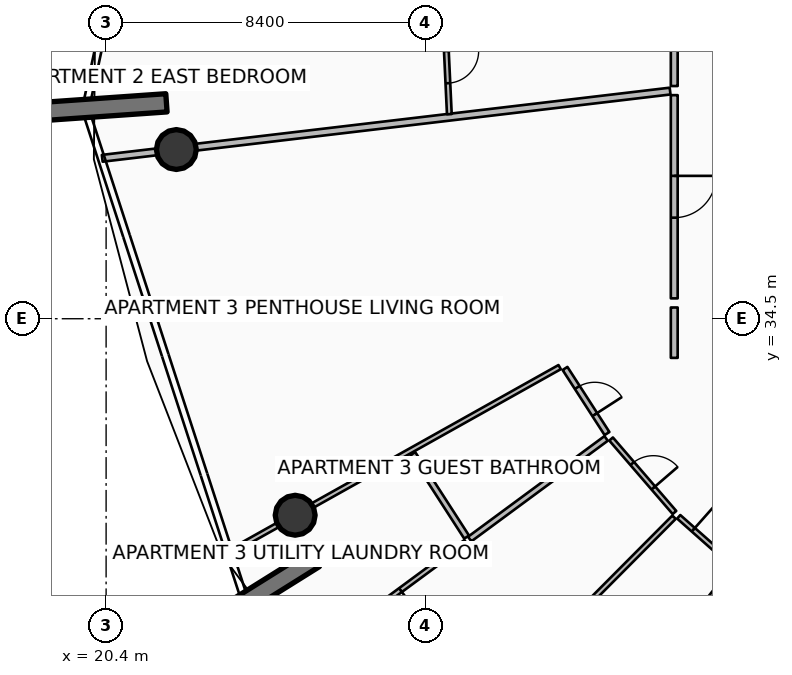
"""IFC4 building model, lengths in metres.
Left out: names, types, materials, properties, quantities, classifications, styles, units other than length and angle.
Written with IfcOpenShell. Run it as: python <this file> out.ifc"""

import sys

from ifc_helpers import new_model, si_unit, direction, frame, frame_2d, origin, origin_2d, place, context, subcontext, project, spatial, rectangle, circle, extrude, element, fill, save


model = new_model("IFC4")
c1 = context("Model", 3, precision=1e-05, world=origin(), true_north=direction((0.0, 1.0)))
c2 = subcontext(c1, "Body", "Model", "MODEL_VIEW")
j1 = project(units=[si_unit("LENGTHUNIT", "METRE"), si_unit("PLANEANGLEUNIT", "RADIAN")], contexts=[c1])
p1 = place(None, origin())
s1 = spatial("IfcSite", under=j1, at=p1, CompositionType="ELEMENT")
p2 = place(p1, origin())
s2 = spatial("IfcBuilding", under=s1, at=p2, CompositionType="ELEMENT")
p3 = place(p2, frame((0.0, 0.0, 180.3)))
s3 = spatial("IfcBuildingStorey", under=s2, at=p3, CompositionType="ELEMENT", Elevation=180.3)
p4 = place(p3, frame((21.987, 40.181, 0.0), z_axis=(0.0, 0.0, 1.0), x_axis=(-0.997568676264, -0.069690287244, 0.0)))
e1 = element("IfcWall", 1, at=p4, inside=s3, PredefinedType="SOLIDWALL", context=c2, shape_type="SweptSolid", body=[
    extrude(rectangle(XDim=3.5, YDim=0.48, at=frame_2d((1.75, 0.0))), origin(), (0.0, 0.0, 1.0), 3.75),
])
p5 = place(p3, frame((25.886, 28.182, 0.0), z_axis=(0.0, 0.0, 1.0), x_axis=(-0.848033572426, -0.529942506352, 0.0)))
e2 = element("IfcWall", 2, at=p5, inside=s3, PredefinedType="SOLIDWALL", context=c2, shape_type="SweptSolid", body=[
    extrude(rectangle(XDim=3.5, YDim=0.48, at=frame_2d((1.75, 0.0))), origin(), (0.0, 0.0, 1.0), 3.75),
])
for number, where, z_axis, x_axis in (
    (3, (22.248, 38.952, 0.0), (0.0, 0.0, 1.0), (1.0, 0.0, 0.0)),
    (4, (25.375, 29.329, 0.0), (0.0, 0.0, 1.0), (1.0, 0.0, 0.0)),
):
    element("IfcColumn", number, at=place(p3, frame(where, z_axis=z_axis, x_axis=x_axis)), inside=s3, PredefinedType="COLUMN", context=c2, shape_type="SweptSolid", body=[
        extrude(circle(Radius=0.525, at=origin_2d()), origin(), (0.0, 0.0, 1.0), 3.5),
    ])
p6 = place(p3, frame((35.241, 40.49, 0.0), z_axis=(0.0, 0.0, 1.0), x_axis=(-0.993066731786, -0.117551972417, 0.0)))
e5 = element("IfcWall", 5, at=p6, inside=s3, PredefinedType="PARTITIONING", context=c2, shape_type="SweptSolid", body=[
    extrude(rectangle(XDim=15.047, YDim=0.18, at=frame_2d((7.523, 0.0))), origin(), (0.0, 0.0, 1.0), 2.94),
])
p7 = place(p3, frame((35.35, 45.448, 0.0), z_axis=(0.0, 0.0, 1.0), x_axis=(0.0, -1.0, 0.0)))
e6 = element("IfcWall", 6, at=p7, inside=s3, PredefinedType="PARTITIONING", context=c2, shape_type="SweptSolid", body=[
    extrude(rectangle(XDim=4.825, YDim=0.18, at=frame_2d((2.413, 0.0))), origin(), (0.0, 0.0, 1.0), 2.94),
])
p8 = place(p3, frame((29.315, 42.361, 0.0), z_axis=(0.0, 0.0, 1.0), x_axis=(0.047144289587, -0.998888089808, 0.0)))
e7 = element("IfcWall", 7, at=p8, inside=s3, PredefinedType="PARTITIONING", context=c2, shape_type="SweptSolid", body=[
    extrude(rectangle(XDim=2.48, YDim=0.125, at=frame_2d((1.24, 0.0))), origin(), (0.0, 0.0, 1.0), 2.94),
])
p9 = place(p8, frame((0.815, 0.0, 0.0)))
e8 = element("IfcOpeningElement", 8, at=p9, cuts=e7, PredefinedType="OPENING", context=c2, shape_type="SweptSolid", body=[
    extrude(rectangle(XDim=0.85, YDim=2.06, at=frame_2d((0.425, 1.03))), frame((0.0, 0.073, 0.0), z_axis=(0.0, -1.0, 0.0), x_axis=(1.0, 0.0, 0.0)), (0.0, 0.0, 1.0), 0.145),
])
p10 = place(p3, frame((35.35, 40.383, 0.0), z_axis=(0.0, 0.0, 1.0), x_axis=(0.0, -1.0, 0.0)))
e9 = element("IfcWall", 9, at=p10, inside=s3, PredefinedType="PARTITIONING", context=c2, shape_type="SweptSolid", body=[
    extrude(rectangle(XDim=5.347, YDim=0.18, at=frame_2d((2.674, 0.0))), origin(), (0.0, 0.0, 1.0), 2.94),
])
p11 = place(p10, frame((2.124, 0.0, 0.0)))
e10 = element("IfcOpeningElement", 10, at=p11, cuts=e9, PredefinedType="OPENING", context=c2, shape_type="SweptSolid", body=[
    extrude(rectangle(XDim=1.1, YDim=2.1, at=frame_2d((0.55, 1.05))), frame((0.0, 0.1, 0.0), z_axis=(0.0, -1.0, 0.0), x_axis=(1.0, 0.0, 0.0)), (0.0, 0.0, 1.0), 0.2),
])
p12 = place(p3, frame((35.35, 34.796, 0.0), z_axis=(0.0, 0.0, 1.0), x_axis=(0.0, -1.0, 0.0)))
e11 = element("IfcWall", 11, at=p12, inside=s3, PredefinedType="PARTITIONING", context=c2, shape_type="SweptSolid", body=[
    extrude(rectangle(XDim=1.326, YDim=0.18, at=frame_2d((0.663, 0.0))), origin(), (0.0, 0.0, 1.0), 2.94),
])
p13 = place(p3, frame((32.334, 33.227, 0.0), z_axis=(0.0, 0.0, 1.0), x_axis=(-0.872500152392, -0.488613839424, 0.0)))
e12 = element("IfcWall", 12, at=p13, inside=s3, PredefinedType="PARTITIONING", context=c2, shape_type="SweptSolid", body=[
    extrude(rectangle(XDim=9.94, YDim=0.125, at=frame_2d((4.97, 0.0))), origin(), (0.0, 0.0, 1.0), 2.94),
])
p14 = place(p3, frame((32.476, 33.192, 0.0), z_axis=(0.0, 0.0, 1.0), x_axis=(0.542143239932, -0.840286086637, 0.0)))
e13 = element("IfcWall", 13, at=p14, inside=s3, PredefinedType="PARTITIONING", context=c2, shape_type="SweptSolid", body=[
    extrude(rectangle(XDim=2.038, YDim=0.15, at=frame_2d((1.019, 0.0))), origin(), (0.0, 0.0, 1.0), 2.94),
])
p15 = place(p14, frame((0.594, 0.0, 0.0)))
e14 = element("IfcOpeningElement", 14, at=p15, cuts=e13, PredefinedType="OPENING", context=c2, shape_type="SweptSolid", body=[
    extrude(rectangle(XDim=0.85, YDim=2.06, at=frame_2d((0.425, 1.03))), frame((0.0, 0.085, 0.0), z_axis=(0.0, -1.0, 0.0), x_axis=(1.0, 0.0, 0.0)), (0.0, 0.0, 1.0), 0.17),
])
p16 = place(p3, frame((28.471, 30.949, 0.0), z_axis=(0.0, 0.0, 1.0), x_axis=(0.542080018781, -0.840326872853, 0.0)))
e15 = element("IfcWall", 15, at=p16, inside=s3, PredefinedType="PARTITIONING", context=c2, shape_type="SweptSolid", body=[
    extrude(rectangle(XDim=2.611, YDim=0.15, at=frame_2d((1.306, 0.0))), origin(), (0.0, 0.0, 1.0), 2.94),
])
p17 = place(p3, frame((33.557, 31.35, 0.0), z_axis=(0.0, 0.0, 1.0), x_axis=(-0.804841149106, -0.593490290322, 0.0)))
e16 = element("IfcWall", 16, at=p17, inside=s3, PredefinedType="PARTITIONING", context=c2, shape_type="SweptSolid", body=[
    extrude(rectangle(XDim=4.46, YDim=0.15, at=frame_2d((2.23, 0.0))), origin(), (0.0, 0.0, 1.0), 2.94),
])
p18 = place(p3, frame((29.863, 28.626, 0.0), z_axis=(0.0, 0.0, 1.0), x_axis=(-0.804842237675, -0.593488814094, 0.0)))
e17 = element("IfcWall", 17, at=p18, inside=s3, PredefinedType="PARTITIONING", context=c2, shape_type="SweptSolid", body=[
    extrude(rectangle(XDim=5.115, YDim=0.125, at=frame_2d((2.558, 0.0))), origin(), (0.0, 0.0, 1.0), 2.94),
])
p19 = place(p18, frame((2.133, 0.0, 0.0)))
e18 = element("IfcOpeningElement", 18, at=p19, cuts=e17, PredefinedType="OPENING", context=c2, shape_type="SweptSolid", body=[
    extrude(rectangle(XDim=0.85, YDim=2.06, at=frame_2d((0.425, 1.03))), frame((0.0, 0.073, 0.0), z_axis=(0.0, -1.0, 0.0), x_axis=(1.0, 0.0, 0.0)), (0.0, 0.0, 1.0), 0.145),
])
p20 = place(p3, frame((35.344, 29.277, 0.0), z_axis=(0.0, 0.0, 1.0), x_axis=(-0.705226489462, -0.708982086206, 0.0)))
e19 = element("IfcWall", 19, at=p20, inside=s3, PredefinedType="PARTITIONING", context=c2, shape_type="SweptSolid", body=[
    extrude(rectangle(XDim=9.166, YDim=0.125, at=frame_2d((4.583, 0.0))), origin(), (0.0, 0.0, 1.0), 2.94),
])
p21 = place(p3, frame((33.688, 31.335, 0.0), z_axis=(0.0, 0.0, 1.0), x_axis=(0.653119308398, -0.757255022431, 0.0)))
e20 = element("IfcWall", 20, at=p21, inside=s3, PredefinedType="PARTITIONING", context=c2, shape_type="SweptSolid", body=[
    extrude(rectangle(XDim=2.553, YDim=0.125, at=frame_2d((1.277, 0.0))), origin(), (0.0, 0.0, 1.0), 2.94),
])
p22 = place(p21, frame((0.852, 0.0, 0.0)))
e21 = element("IfcOpeningElement", 21, at=p22, cuts=e20, PredefinedType="OPENING", context=c2, shape_type="SweptSolid", body=[
    extrude(rectangle(XDim=0.85, YDim=2.06, at=frame_2d((0.425, 1.03))), frame((0.0, 0.073, 0.0), z_axis=(0.0, -1.0, 0.0), x_axis=(1.0, 0.0, 0.0)), (0.0, 0.0, 1.0), 0.145),
])
p23 = place(p3, frame((35.468, 29.288, 0.0), z_axis=(0.0, 0.0, 1.0), x_axis=(0.748399816021, -0.663247853656, 0.0)))
e22 = element("IfcWall", 22, at=p23, inside=s3, PredefinedType="PARTITIONING", context=c2, shape_type="SweptSolid", body=[
    extrude(rectangle(XDim=1.875, YDim=0.125, at=frame_2d((0.938, 0.0))), origin(), (0.0, 0.0, 1.0), 2.94),
])
p24 = place(p23, frame((0.512, 0.0, 0.0)))
e23 = element("IfcOpeningElement", 23, at=p24, cuts=e22, PredefinedType="OPENING", context=c2, shape_type="SweptSolid", body=[
    extrude(rectangle(XDim=0.85, YDim=2.06, at=frame_2d((0.425, 1.03))), frame((0.0, 0.073, 0.0), z_axis=(0.0, -1.0, 0.0), x_axis=(1.0, 0.0, 0.0)), (0.0, 0.0, 1.0), 0.145),
])
p25 = place(p3, frame((36.884, 27.9, 0.0), z_axis=(0.0, 0.0, 1.0), x_axis=(-0.619094580594, -0.785316433216, 0.0)))
e24 = element("IfcWall", 24, at=p25, inside=s3, PredefinedType="PARTITIONING", context=c2, shape_type="SweptSolid", body=[
    extrude(rectangle(XDim=9.175, YDim=0.125, at=frame_2d((4.588, 0.0))), origin(), (0.0, 0.0, 1.0), 2.94),
])
p26 = place(p9, origin())
e25 = element("IfcDoor", 25, at=p26, inside=s3, OperationType="SINGLE_SWING_LEFT", PredefinedType="DOOR", context=c2, shape_type="SweptSolid", body=[
    extrude(rectangle(XDim=0.85, YDim=2.06, at=frame_2d((0.425, 1.03))), frame((0.0, 0.025, 0.0), z_axis=(0.0, -1.0, 0.0), x_axis=(1.0, 0.0, 0.0)), (0.0, 0.0, 1.0), 0.05),
])
fill(e8, e25)
p27 = place(p11, origin())
e26 = element("IfcDoor", 26, at=p27, inside=s3, OperationType="SINGLE_SWING_LEFT", PredefinedType="DOOR", context=c2, shape_type="SweptSolid", body=[
    extrude(rectangle(XDim=1.1, YDim=2.1, at=frame_2d((0.55, 1.05))), frame((0.0, 0.025, 0.0), z_axis=(0.0, -1.0, 0.0), x_axis=(1.0, 0.0, 0.0)), (0.0, 0.0, 1.0), 0.05),
])
fill(e10, e26)
p28 = place(p15, origin())
e27 = element("IfcDoor", 27, at=p28, inside=s3, OperationType="SINGLE_SWING_RIGHT", PredefinedType="DOOR", context=c2, shape_type="SweptSolid", body=[
    extrude(rectangle(XDim=0.85, YDim=2.06, at=frame_2d((0.425, 1.03))), frame((0.0, 0.025, 0.0), z_axis=(0.0, -1.0, 0.0), x_axis=(1.0, 0.0, 0.0)), (0.0, 0.0, 1.0), 0.05),
])
fill(e14, e27)
p29 = place(p19, origin())
e28 = element("IfcDoor", 28, at=p29, inside=s3, OperationType="SINGLE_SWING_LEFT", PredefinedType="DOOR", context=c2, shape_type="SweptSolid", body=[
    extrude(rectangle(XDim=0.85, YDim=2.06, at=frame_2d((0.425, 1.03))), frame((0.0, 0.025, 0.0), z_axis=(0.0, -1.0, 0.0), x_axis=(1.0, 0.0, 0.0)), (0.0, 0.0, 1.0), 0.05),
])
fill(e18, e28)
p30 = place(p22, origin())
e29 = element("IfcDoor", 29, at=p30, inside=s3, OperationType="SINGLE_SWING_RIGHT", PredefinedType="DOOR", context=c2, shape_type="SweptSolid", body=[
    extrude(rectangle(XDim=0.85, YDim=2.06, at=frame_2d((0.425, 1.03))), frame((0.0, 0.025, 0.0), z_axis=(0.0, -1.0, 0.0), x_axis=(1.0, 0.0, 0.0)), (0.0, 0.0, 1.0), 0.05),
])
fill(e21, e29)
p31 = place(p24, origin())
e30 = element("IfcDoor", 30, at=p31, inside=s3, OperationType="SINGLE_SWING_LEFT", PredefinedType="DOOR", context=c2, shape_type="SweptSolid", body=[
    extrude(rectangle(XDim=0.85, YDim=2.06, at=frame_2d((0.425, 1.03))), frame((0.0, 0.025, 0.0), z_axis=(0.0, -1.0, 0.0), x_axis=(1.0, 0.0, 0.0)), (0.0, 0.0, 1.0), 0.05),
])
fill(e23, e30)
save(model, sys.argv[1])
